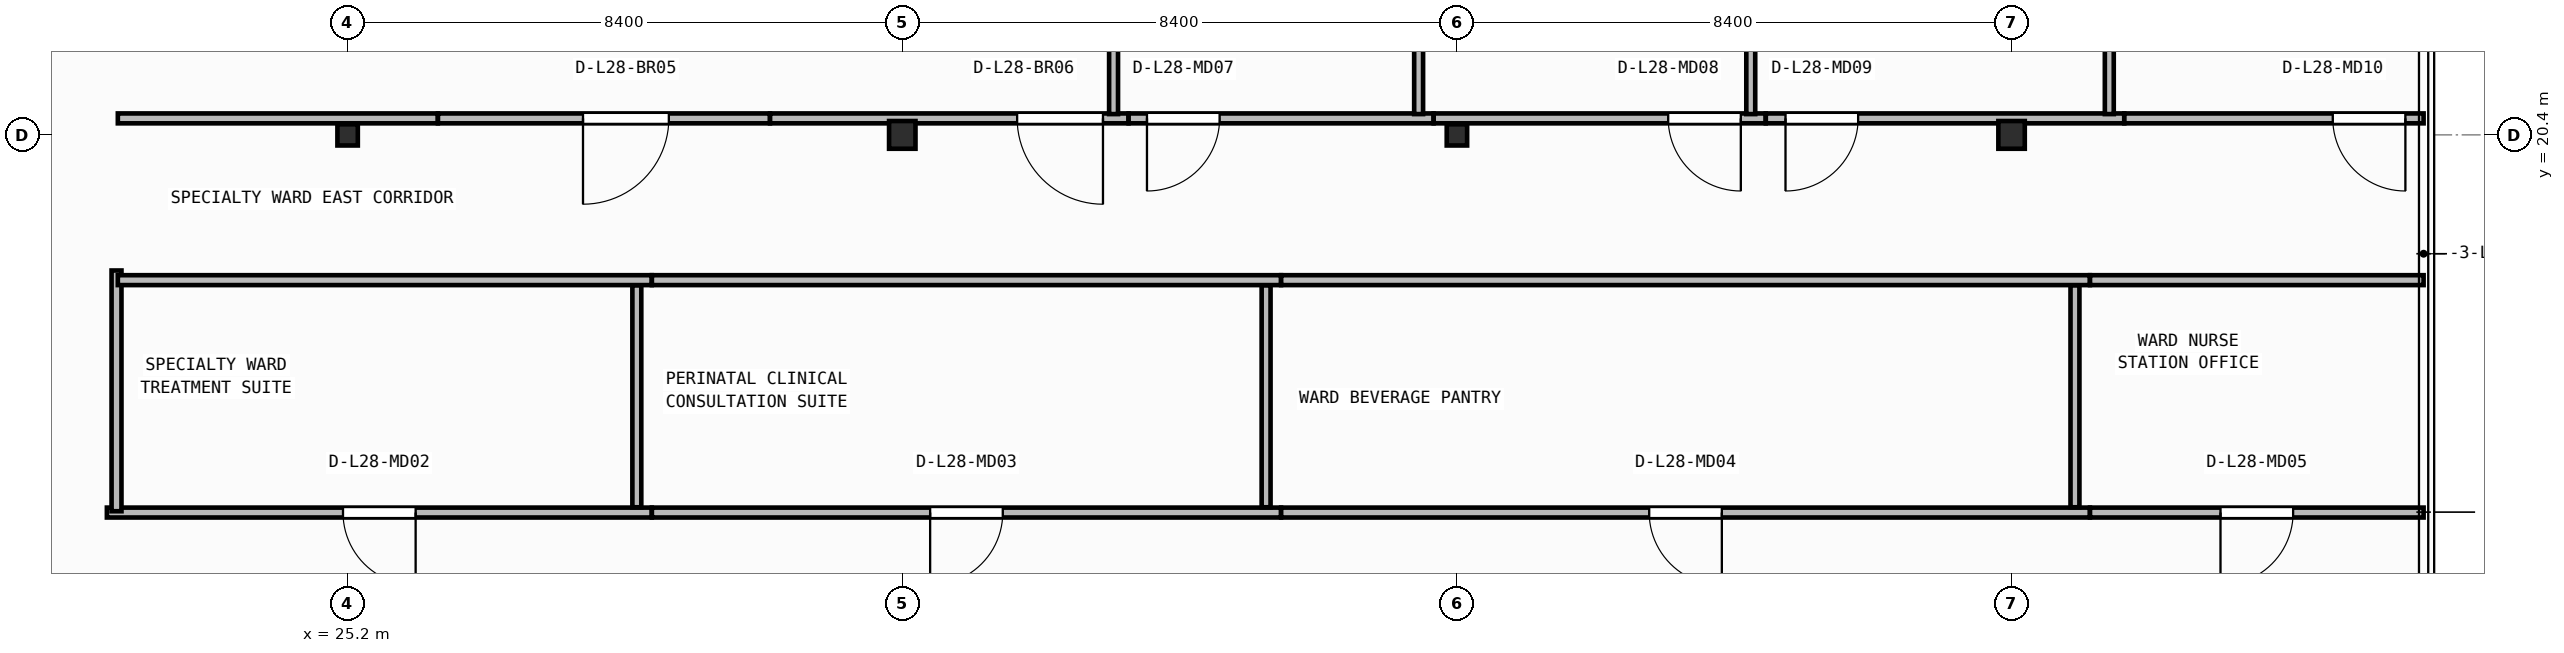
"""IFC4 building model, lengths in metres.
Left out: names, types, materials, properties, quantities, classifications, styles, units other than length and angle.
Written with IfcOpenShell. Run it as: python <this file> out.ifc"""

import sys

from ifc_helpers import new_model, si_unit, direction, frame, frame_2d, origin, origin_2d, place, context, subcontext, project, spatial, rectangle, i_section, extrude, element, fill, save


model = new_model("IFC4")
c1 = context("Model", 3, precision=1e-05, world=origin(), true_north=direction((0.0, 1.0)))
c2 = subcontext(c1, "Body", "Model", "MODEL_VIEW")
j1 = project(units=[si_unit("LENGTHUNIT", "METRE"), si_unit("PLANEANGLEUNIT", "RADIAN")], contexts=[c1])
p1 = place(None, origin())
s1 = spatial("IfcSite", under=j1, at=p1, CompositionType="ELEMENT")
p2 = place(p1, origin())
s2 = spatial("IfcBuilding", under=s1, at=p2, CompositionType="ELEMENT")
p3 = place(p2, frame((0.0, 0.0, 115.2)))
s3 = spatial("IfcBuildingStorey", under=s2, at=p3, CompositionType="ELEMENT", Elevation=115.2)
p4 = place(p3, frame((25.2, 20.4, 0.0), z_axis=(0.0, 0.0, 1.0), x_axis=(1.0, 0.0, 0.0)))
e1 = element("IfcColumn", 1, at=p4, inside=s3, PredefinedType="COLUMN", context=c2, shape_type="SweptSolid", body=[
    extrude(i_section(OverallWidth=0.309, OverallDepth=0.321, WebThickness=0.014, FlangeThickness=0.022, FilletRadius=0.017, at=origin_2d()), origin(), (0.0, 0.0, 1.0), 3.95),
])
p5 = place(p3, frame((33.6, 20.4, 0.0), z_axis=(0.0, 0.0, 1.0), x_axis=(1.0, 0.0, 0.0)))
e2 = element("IfcColumn", 2, at=p5, inside=s3, PredefinedType="COLUMN", context=c2, shape_type="SweptSolid", body=[
    extrude(i_section(OverallWidth=0.4, OverallDepth=0.42, WebThickness=0.025, FlangeThickness=0.04, at=origin_2d()), origin(), (0.0, 0.0, 1.0), 3.95),
])
p6 = place(p3, frame((42.0, 20.4, 0.0), z_axis=(0.0, 0.0, 1.0), x_axis=(1.0, 0.0, 0.0)))
e3 = element("IfcColumn", 3, at=p6, inside=s3, PredefinedType="COLUMN", context=c2, shape_type="SweptSolid", body=[
    extrude(i_section(OverallWidth=0.309, OverallDepth=0.321, WebThickness=0.014, FlangeThickness=0.022, FilletRadius=0.017, at=origin_2d()), origin(), (0.0, 0.0, 1.0), 3.95),
])
p7 = place(p3, frame((50.4, 20.4, 0.0), z_axis=(0.0, 0.0, 1.0), x_axis=(1.0, 0.0, 0.0)))
e4 = element("IfcColumn", 4, at=p7, inside=s3, PredefinedType="COLUMN", context=c2, shape_type="SweptSolid", body=[
    extrude(i_section(OverallWidth=0.4, OverallDepth=0.42, WebThickness=0.025, FlangeThickness=0.04, at=origin_2d()), origin(), (0.0, 0.0, 1.0), 3.95),
])
p8 = place(p3, frame((29.806, 14.68, 0.0), z_axis=(0.0, 0.0, 1.0), x_axis=(-1.0, 0.0, 0.0)))
e5 = element("IfcWall", 5, at=p8, inside=s3, PredefinedType="PARTITIONING", context=c2, shape_type="SweptSolid", body=[
    extrude(rectangle(XDim=8.252, YDim=0.15, at=frame_2d((4.126, 0.0))), origin(), (0.0, 0.0, 1.0), 3.71),
])
p9 = place(p8, frame((3.576, 0.0, 0.0)))
e6 = element("IfcOpeningElement", 6, at=p9, cuts=e5, PredefinedType="OPENING", context=c2, shape_type="SweptSolid", body=[
    extrude(rectangle(XDim=1.1, YDim=2.1, at=frame_2d((0.55, 1.05))), frame((0.0, 0.085, 0.0), z_axis=(0.0, -1.0, 0.0), x_axis=(1.0, 0.0, 0.0)), (0.0, 0.0, 1.0), 0.17),
])
p10 = place(p3, frame((39.336, 14.68, 0.0), z_axis=(0.0, 0.0, 1.0), x_axis=(-1.0, 0.0, 0.0)))
e7 = element("IfcWall", 7, at=p10, inside=s3, PredefinedType="PARTITIONING", context=c2, shape_type="SweptSolid", body=[
    extrude(rectangle(XDim=9.528, YDim=0.15, at=frame_2d((4.764, 0.0))), origin(), (0.0, 0.0, 1.0), 3.71),
])
p11 = place(p10, frame((4.214, 0.0, 0.0)))
e8 = element("IfcOpeningElement", 8, at=p11, cuts=e7, PredefinedType="OPENING", context=c2, shape_type="SweptSolid", body=[
    extrude(rectangle(XDim=1.1, YDim=2.1, at=frame_2d((0.55, 1.05))), frame((0.0, 0.085, 0.0), z_axis=(0.0, -1.0, 0.0), x_axis=(1.0, 0.0, 0.0)), (0.0, 0.0, 1.0), 0.17),
])
p12 = place(p3, frame((51.586, 14.68, 0.0), z_axis=(0.0, 0.0, 1.0), x_axis=(-1.0, 0.0, 0.0)))
e9 = element("IfcWall", 9, at=p12, inside=s3, PredefinedType="PARTITIONING", context=c2, shape_type="SweptSolid", body=[
    extrude(rectangle(XDim=12.248, YDim=0.15, at=frame_2d((6.124, 0.0))), origin(), (0.0, 0.0, 1.0), 3.71),
])
p13 = place(p12, frame((5.574, 0.0, 0.0)))
e10 = element("IfcOpeningElement", 10, at=p13, cuts=e9, PredefinedType="OPENING", context=c2, shape_type="SweptSolid", body=[
    extrude(rectangle(XDim=1.1, YDim=2.1, at=frame_2d((0.55, 1.05))), frame((0.0, 0.085, 0.0), z_axis=(0.0, -1.0, 0.0), x_axis=(1.0, 0.0, 0.0)), (0.0, 0.0, 1.0), 0.17),
])
p14 = place(p3, frame((56.64, 14.68, 0.0), z_axis=(0.0, 0.0, 1.0), x_axis=(-1.0, 0.0, 0.0)))
e11 = element("IfcWall", 11, at=p14, inside=s3, PredefinedType="PARTITIONING", context=c2, shape_type="SweptSolid", body=[
    extrude(rectangle(XDim=5.052, YDim=0.15, at=frame_2d((2.526, 0.0))), origin(), (0.0, 0.0, 1.0), 3.71),
])
p15 = place(p14, frame((1.976, 0.0, 0.0)))
e12 = element("IfcOpeningElement", 12, at=p15, cuts=e11, PredefinedType="OPENING", context=c2, shape_type="SweptSolid", body=[
    extrude(rectangle(XDim=1.1, YDim=2.1, at=frame_2d((0.55, 1.05))), frame((0.0, 0.085, 0.0), z_axis=(0.0, -1.0, 0.0), x_axis=(1.0, 0.0, 0.0)), (0.0, 0.0, 1.0), 0.17),
])
p16 = place(p3, frame((21.7, 14.7, 0.0), z_axis=(0.0, 0.0, 1.0), x_axis=(0.0, 1.0, 0.0)))
e13 = element("IfcWall", 13, at=p16, inside=s3, PredefinedType="PARTITIONING", context=c2, shape_type="SweptSolid", body=[
    extrude(rectangle(XDim=3.646, YDim=0.15, at=frame_2d((1.823, 0.0))), origin(), (0.0, 0.0, 1.0), 3.71),
])
p17 = place(p3, frame((21.72, 18.2, 0.0), z_axis=(0.0, 0.0, 1.0), x_axis=(1.0, 0.0, 0.0)))
e14 = element("IfcWall", 14, at=p17, inside=s3, PredefinedType="PARTITIONING", context=c2, shape_type="SweptSolid", body=[
    extrude(rectangle(XDim=8.086, YDim=0.15, at=frame_2d((4.043, 0.0))), origin(), (0.0, 0.0, 1.0), 3.71),
])
p18 = place(p3, frame((29.808, 18.2, 0.0), z_axis=(0.0, 0.0, 1.0), x_axis=(1.0, 0.0, 0.0)))
e15 = element("IfcWall", 15, at=p18, inside=s3, PredefinedType="PARTITIONING", context=c2, shape_type="SweptSolid", body=[
    extrude(rectangle(XDim=9.528, YDim=0.15, at=frame_2d((4.764, 0.0))), origin(), (0.0, 0.0, 1.0), 3.71),
])
p19 = place(p3, frame((39.338, 18.2, 0.0), z_axis=(0.0, 0.0, 1.0), x_axis=(1.0, 0.0, 0.0)))
e16 = element("IfcWall", 16, at=p19, inside=s3, PredefinedType="PARTITIONING", context=c2, shape_type="SweptSolid", body=[
    extrude(rectangle(XDim=12.248, YDim=0.15, at=frame_2d((6.124, 0.0))), origin(), (0.0, 0.0, 1.0), 3.71),
])
p20 = place(p3, frame((51.588, 18.2, 0.0), z_axis=(0.0, 0.0, 1.0), x_axis=(1.0, 0.0, 0.0)))
e17 = element("IfcWall", 17, at=p20, inside=s3, PredefinedType="PARTITIONING", context=c2, shape_type="SweptSolid", body=[
    extrude(rectangle(XDim=5.052, YDim=0.15, at=frame_2d((2.526, 0.0))), origin(), (0.0, 0.0, 1.0), 3.71),
])
p21 = place(p3, frame((26.566, 20.65, 0.0), z_axis=(0.0, 0.0, 1.0), x_axis=(-1.0, 0.0, 0.0)))
e18 = element("IfcWall", 18, at=p21, inside=s3, PredefinedType="PARTITIONING", context=c2, shape_type="SweptSolid", body=[
    extrude(rectangle(XDim=4.846, YDim=0.15, at=frame_2d((2.423, 0.0))), origin(), (0.0, 0.0, 1.0), 3.083),
])
p22 = place(p3, frame((31.596, 20.65, 0.0), z_axis=(0.0, 0.0, 1.0), x_axis=(-1.0, 0.0, 0.0)))
e19 = element("IfcWall", 19, at=p22, inside=s3, PredefinedType="PARTITIONING", context=c2, shape_type="SweptSolid", body=[
    extrude(rectangle(XDim=5.028, YDim=0.15, at=frame_2d((2.514, 0.0))), origin(), (0.0, 0.0, 1.0), 3.083),
])
p23 = place(p22, frame((1.531, 0.0, 0.0)))
e20 = element("IfcOpeningElement", 20, at=p23, cuts=e19, PredefinedType="OPENING", context=c2, shape_type="SweptSolid", body=[
    extrude(rectangle(XDim=1.3, YDim=2.15, at=frame_2d((0.65, 1.075))), frame((0.0, 0.085, 0.0), z_axis=(0.0, -1.0, 0.0), x_axis=(1.0, 0.0, 0.0)), (0.0, 0.0, 1.0), 0.17),
])
p24 = place(p3, frame((37.026, 20.65, 0.0), z_axis=(0.0, 0.0, 1.0), x_axis=(-1.0, 0.0, 0.0)))
e21 = element("IfcWall", 21, at=p24, inside=s3, PredefinedType="PARTITIONING", context=c2, shape_type="SweptSolid", body=[
    extrude(rectangle(XDim=5.428, YDim=0.15, at=frame_2d((2.714, 0.0))), origin(), (0.0, 0.0, 1.0), 3.083),
])
p25 = place(p24, frame((0.386, 0.0, 0.0)))
e22 = element("IfcOpeningElement", 22, at=p25, cuts=e21, PredefinedType="OPENING", context=c2, shape_type="SweptSolid", body=[
    extrude(rectangle(XDim=1.3, YDim=2.15, at=frame_2d((0.65, 1.075))), frame((0.0, 0.085, 0.0), z_axis=(0.0, -1.0, 0.0), x_axis=(1.0, 0.0, 0.0)), (0.0, 0.0, 1.0), 0.17),
])
p26 = place(p3, frame((41.646, 20.65, 0.0), z_axis=(0.0, 0.0, 1.0), x_axis=(-1.0, 0.0, 0.0)))
e23 = element("IfcWall", 23, at=p26, inside=s3, PredefinedType="PARTITIONING", context=c2, shape_type="SweptSolid", body=[
    extrude(rectangle(XDim=4.618, YDim=0.15, at=frame_2d((2.309, 0.0))), origin(), (0.0, 0.0, 1.0), 3.083),
])
p27 = place(p26, frame((3.24, 0.0, 0.0)))
e24 = element("IfcOpeningElement", 24, at=p27, cuts=e23, PredefinedType="OPENING", context=c2, shape_type="SweptSolid", body=[
    extrude(rectangle(XDim=1.1, YDim=2.1, at=frame_2d((0.55, 1.05))), frame((0.0, 0.085, 0.0), z_axis=(0.0, -1.0, 0.0), x_axis=(1.0, 0.0, 0.0)), (0.0, 0.0, 1.0), 0.17),
])
p28 = place(p3, frame((46.676, 20.65, 0.0), z_axis=(0.0, 0.0, 1.0), x_axis=(-1.0, 0.0, 0.0)))
e25 = element("IfcWall", 25, at=p28, inside=s3, PredefinedType="PARTITIONING", context=c2, shape_type="SweptSolid", body=[
    extrude(rectangle(XDim=5.028, YDim=0.15, at=frame_2d((2.514, 0.0))), origin(), (0.0, 0.0, 1.0), 3.083),
])
p29 = place(p28, frame((0.376, 0.0, 0.0)))
e26 = element("IfcOpeningElement", 26, at=p29, cuts=e25, PredefinedType="OPENING", context=c2, shape_type="SweptSolid", body=[
    extrude(rectangle(XDim=1.1, YDim=2.1, at=frame_2d((0.55, 1.05))), frame((0.0, 0.085, 0.0), z_axis=(0.0, -1.0, 0.0), x_axis=(1.0, 0.0, 0.0)), (0.0, 0.0, 1.0), 0.17),
])
p30 = place(p3, frame((52.106, 20.65, 0.0), z_axis=(0.0, 0.0, 1.0), x_axis=(-1.0, 0.0, 0.0)))
e27 = element("IfcWall", 27, at=p30, inside=s3, PredefinedType="PARTITIONING", context=c2, shape_type="SweptSolid", body=[
    extrude(rectangle(XDim=5.428, YDim=0.15, at=frame_2d((2.714, 0.0))), origin(), (0.0, 0.0, 1.0), 3.083),
])
p31 = place(p30, frame((4.03, 0.0, 0.0)))
e28 = element("IfcOpeningElement", 28, at=p31, cuts=e27, PredefinedType="OPENING", context=c2, shape_type="SweptSolid", body=[
    extrude(rectangle(XDim=1.1, YDim=2.1, at=frame_2d((0.55, 1.05))), frame((0.0, 0.085, 0.0), z_axis=(0.0, -1.0, 0.0), x_axis=(1.0, 0.0, 0.0)), (0.0, 0.0, 1.0), 0.17),
])
p32 = place(p3, frame((56.64, 20.65, 0.0), z_axis=(0.0, 0.0, 1.0), x_axis=(-1.0, 0.0, 0.0)))
e29 = element("IfcWall", 29, at=p32, inside=s3, PredefinedType="PARTITIONING", context=c2, shape_type="SweptSolid", body=[
    extrude(rectangle(XDim=4.532, YDim=0.15, at=frame_2d((2.266, 0.0))), origin(), (0.0, 0.0, 1.0), 3.71),
])
p33 = place(p32, frame((0.276, 0.0, 0.0)))
e30 = element("IfcOpeningElement", 30, at=p33, cuts=e29, PredefinedType="OPENING", context=c2, shape_type="SweptSolid", body=[
    extrude(rectangle(XDim=1.1, YDim=2.1, at=frame_2d((0.55, 1.05))), frame((0.0, 0.085, 0.0), z_axis=(0.0, -1.0, 0.0), x_axis=(1.0, 0.0, 0.0)), (0.0, 0.0, 1.0), 0.17),
])
for number, where, z_axis, x_axis in (
    (31, (29.58, 14.76, 0.0), (0.0, 0.0, 1.0), (0.0, 1.0, 0.0)),
    (32, (39.11, 14.76, 0.0), (0.0, 0.0, 1.0), (0.0, 1.0, 0.0)),
    (33, (51.36, 14.76, 0.0), (0.0, 0.0, 1.0), (0.0, 1.0, 0.0)),
):
    element("IfcWall", number, at=place(p3, frame(where, z_axis=z_axis, x_axis=x_axis)), inside=s3, PredefinedType="PARTITIONING", context=c2, shape_type="SweptSolid", body=[
        extrude(rectangle(XDim=3.36, YDim=0.135, at=frame_2d((1.68, 0.0))), origin(), (0.0, 0.0, 1.0), 3.71),
    ])
for number, where, z_axis, x_axis in (
    (34, (36.8, 20.715, 0.0), (0.0, 0.0, 1.0), (0.0, 1.0, 0.0)),
    (35, (41.42, 20.715, 0.0), (0.0, 0.0, 1.0), (0.0, 1.0, 0.0)),
    (36, (46.45, 20.715, 0.0), (0.0, 0.0, 1.0), (0.0, 1.0, 0.0)),
    (37, (51.88, 20.715, 0.0), (0.0, 0.0, 1.0), (0.0, 1.0, 0.0)),
):
    element("IfcWall", number, at=place(p3, frame(where, z_axis=z_axis, x_axis=x_axis)), inside=s3, PredefinedType="PARTITIONING", context=c2, shape_type="SweptSolid", body=[
        extrude(rectangle(XDim=6.385, YDim=0.135, at=frame_2d((3.192, 0.0))), origin(), (0.0, 0.0, 1.0), 3.71),
    ])
p34 = place(p9, origin())
e38 = element("IfcDoor", 38, at=p34, inside=s3, OperationType="SINGLE_SWING_LEFT", PredefinedType="DOOR", context=c2, shape_type="SweptSolid", body=[
    extrude(rectangle(XDim=1.1, YDim=2.1, at=frame_2d((0.55, 1.05))), frame((0.0, 0.025, 0.0), z_axis=(0.0, -1.0, 0.0), x_axis=(1.0, 0.0, 0.0)), (0.0, 0.0, 1.0), 0.05),
])
fill(e6, e38)
p35 = place(p11, origin())
e39 = element("IfcDoor", 39, at=p35, inside=s3, OperationType="SINGLE_SWING_RIGHT", PredefinedType="DOOR", context=c2, shape_type="SweptSolid", body=[
    extrude(rectangle(XDim=1.1, YDim=2.1, at=frame_2d((0.55, 1.05))), frame((0.0, 0.025, 0.0), z_axis=(0.0, -1.0, 0.0), x_axis=(1.0, 0.0, 0.0)), (0.0, 0.0, 1.0), 0.05),
])
fill(e8, e39)
p36 = place(p13, origin())
e40 = element("IfcDoor", 40, at=p36, inside=s3, OperationType="SINGLE_SWING_LEFT", PredefinedType="DOOR", context=c2, shape_type="SweptSolid", body=[
    extrude(rectangle(XDim=1.1, YDim=2.1, at=frame_2d((0.55, 1.05))), frame((0.0, 0.025, 0.0), z_axis=(0.0, -1.0, 0.0), x_axis=(1.0, 0.0, 0.0)), (0.0, 0.0, 1.0), 0.05),
])
fill(e10, e40)
p37 = place(p15, origin())
e41 = element("IfcDoor", 41, at=p37, inside=s3, OperationType="SINGLE_SWING_RIGHT", PredefinedType="DOOR", context=c2, shape_type="SweptSolid", body=[
    extrude(rectangle(XDim=1.1, YDim=2.1, at=frame_2d((0.55, 1.05))), frame((0.0, 0.025, 0.0), z_axis=(0.0, -1.0, 0.0), x_axis=(1.0, 0.0, 0.0)), (0.0, 0.0, 1.0), 0.05),
])
fill(e12, e41)
p38 = place(p23, origin())
e42 = element("IfcDoor", 42, at=p38, inside=s3, OperationType="SINGLE_SWING_RIGHT", PredefinedType="DOOR", context=c2, shape_type="SweptSolid", body=[
    extrude(rectangle(XDim=1.3, YDim=2.15, at=frame_2d((0.65, 1.075))), frame((0.0, 0.025, 0.0), z_axis=(0.0, -1.0, 0.0), x_axis=(1.0, 0.0, 0.0)), (0.0, 0.0, 1.0), 0.05),
])
fill(e20, e42)
p39 = place(p25, origin())
e43 = element("IfcDoor", 43, at=p39, inside=s3, OperationType="SINGLE_SWING_LEFT", PredefinedType="DOOR", context=c2, shape_type="SweptSolid", body=[
    extrude(rectangle(XDim=1.3, YDim=2.15, at=frame_2d((0.65, 1.075))), frame((0.0, 0.025, 0.0), z_axis=(0.0, -1.0, 0.0), x_axis=(1.0, 0.0, 0.0)), (0.0, 0.0, 1.0), 0.05),
])
fill(e22, e43)
p40 = place(p27, origin())
e44 = element("IfcDoor", 44, at=p40, inside=s3, OperationType="SINGLE_SWING_RIGHT", PredefinedType="DOOR", context=c2, shape_type="SweptSolid", body=[
    extrude(rectangle(XDim=1.1, YDim=2.1, at=frame_2d((0.55, 1.05))), frame((0.0, 0.025, 0.0), z_axis=(0.0, -1.0, 0.0), x_axis=(1.0, 0.0, 0.0)), (0.0, 0.0, 1.0), 0.05),
])
fill(e24, e44)
p41 = place(p29, origin())
e45 = element("IfcDoor", 45, at=p41, inside=s3, OperationType="SINGLE_SWING_LEFT", PredefinedType="DOOR", context=c2, shape_type="SweptSolid", body=[
    extrude(rectangle(XDim=1.1, YDim=2.1, at=frame_2d((0.55, 1.05))), frame((0.0, 0.025, 0.0), z_axis=(0.0, -1.0, 0.0), x_axis=(1.0, 0.0, 0.0)), (0.0, 0.0, 1.0), 0.05),
])
fill(e26, e45)
p42 = place(p31, origin())
e46 = element("IfcDoor", 46, at=p42, inside=s3, OperationType="SINGLE_SWING_RIGHT", PredefinedType="DOOR", context=c2, shape_type="SweptSolid", body=[
    extrude(rectangle(XDim=1.1, YDim=2.1, at=frame_2d((0.55, 1.05))), frame((0.0, 0.025, 0.0), z_axis=(0.0, -1.0, 0.0), x_axis=(1.0, 0.0, 0.0)), (0.0, 0.0, 1.0), 0.05),
])
fill(e28, e46)
p43 = place(p33, origin())
e47 = element("IfcDoor", 47, at=p43, inside=s3, OperationType="SINGLE_SWING_LEFT", PredefinedType="DOOR", context=c2, shape_type="SweptSolid", body=[
    extrude(rectangle(XDim=1.1, YDim=2.1, at=frame_2d((0.55, 1.05))), frame((0.0, 0.025, 0.0), z_axis=(0.0, -1.0, 0.0), x_axis=(1.0, 0.0, 0.0)), (0.0, 0.0, 1.0), 0.05),
])
fill(e30, e47)
save(model, sys.argv[1])
